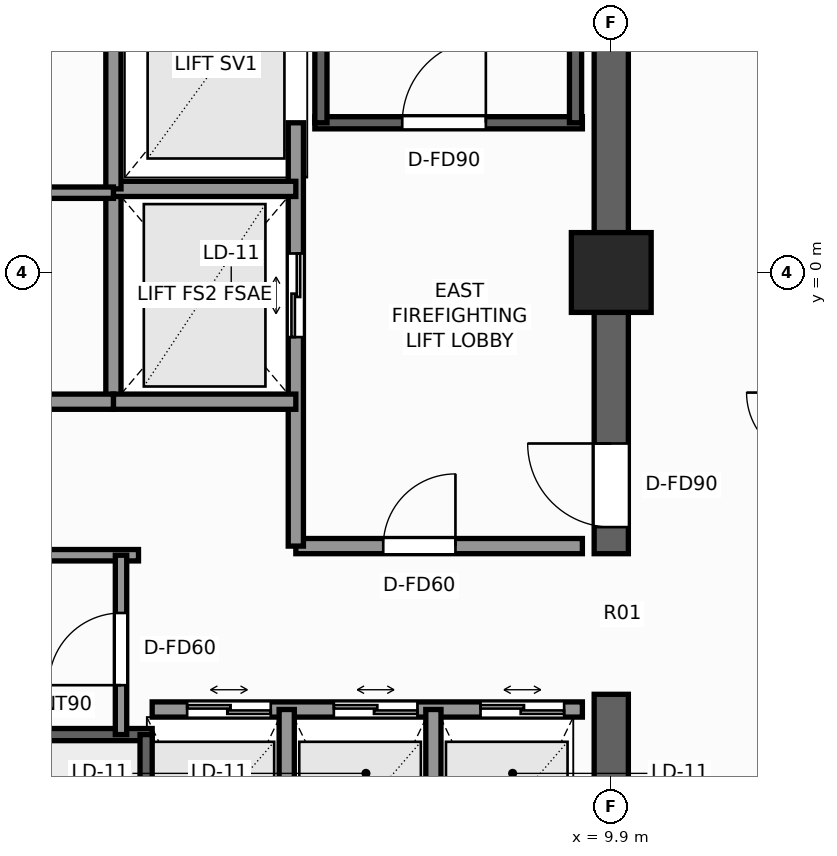
"""IFC4 building model, lengths in metres.
Left out: names, types, materials, properties, quantities, classifications, styles, units other than length and angle.
Written with IfcOpenShell. Run it as: python <this file> out.ifc"""

import sys

from ifc_helpers import new_model, si_unit, direction, frame, frame_2d, origin, origin_2d, place, context, subcontext, project, spatial, rectangle, extrude, element, fill, save


model = new_model("IFC4")
c1 = context("Model", 3, precision=1e-05, world=origin(), true_north=direction((0.0, 1.0)))
c2 = subcontext(c1, "Body", "Model", "MODEL_VIEW")
j1 = project(units=[si_unit("LENGTHUNIT", "METRE"), si_unit("PLANEANGLEUNIT", "RADIAN")], contexts=[c1])
p1 = place(None, origin())
s1 = spatial("IfcSite", under=j1, at=p1, CompositionType="ELEMENT")
p2 = place(p1, origin())
s2 = spatial("IfcBuilding", under=s1, at=p2, CompositionType="ELEMENT")
p3 = place(p2, frame((0.0, 0.0, 209.7)))
s3 = spatial("IfcBuildingStorey", under=s2, at=p3, CompositionType="ELEMENT", Elevation=209.7)
p4 = place(p3, frame((9.9, -9.675, 0.0), z_axis=(0.0, 0.0, 1.0), x_axis=(0.0, 1.0, 0.0)))
e1 = element("IfcWall", 1, at=p4, inside=s3, PredefinedType="SHEAR", context=c2, shape_type="SweptSolid", body=[
    extrude(rectangle(XDim=4.125, YDim=0.45, at=frame_2d((2.062, 0.0))), origin(), (0.0, 0.0, 1.0), 3.3),
])
p5 = place(p3, frame((9.9, -3.7, 0.0), z_axis=(0.0, 0.0, 1.0), x_axis=(0.0, 1.0, 0.0)))
e2 = element("IfcWall", 2, at=p5, inside=s3, PredefinedType="SHEAR", context=c2, shape_type="SweptSolid", body=[
    extrude(rectangle(XDim=13.375, YDim=0.45, at=frame_2d((6.688, 0.0))), origin(), (0.0, 0.0, 1.0), 3.3),
])
p6 = place(p5, frame((0.35, 0.0, 0.0)))
e3 = element("IfcOpeningElement", 3, at=p6, cuts=e2, PredefinedType="OPENING", context=c2, shape_type="SweptSolid", body=[
    extrude(rectangle(XDim=1.1, YDim=2.2, at=frame_2d((0.55, 1.1))), frame((0.0, 0.235, 0.0), z_axis=(0.0, -1.0, 0.0), x_axis=(1.0, 0.0, 0.0)), (0.0, 0.0, 1.0), 0.47),
])
p7 = place(p3, frame((9.9, 0.0, 0.0), z_axis=(0.0, 0.0, 1.0), x_axis=(1.0, 0.0, 0.0)))
e4 = element("IfcColumn", 4, at=p7, inside=s3, PredefinedType="COLUMN", context=c2, shape_type="SweptSolid", body=[
    extrude(rectangle(XDim=1.05, YDim=1.05, at=origin_2d()), origin(), (0.0, 0.0, 1.0), 3.3),
])
p8 = place(p3, frame((6.0, 1.97, 0.0), z_axis=(0.0, 0.0, 1.0), x_axis=(1.0, 0.0, 0.0)))
e5 = element("IfcWall", 5, at=p8, inside=s3, PredefinedType="SHEAR", context=c2, shape_type="SweptSolid", body=[
    extrude(rectangle(XDim=3.52, YDim=0.16, at=frame_2d((1.76, 0.0))), origin(), (0.0, 0.0, 1.0), 3.3),
])
p9 = place(p8, frame((1.15, 0.0, 0.0)))
e6 = element("IfcOpeningElement", 6, at=p9, cuts=e5, PredefinedType="OPENING", context=c2, shape_type="SweptSolid", body=[
    extrude(rectangle(XDim=1.1, YDim=2.2, at=frame_2d((0.55, 1.1))), frame((0.0, 0.09, 0.0), z_axis=(0.0, -1.0, 0.0), x_axis=(1.0, 0.0, 0.0)), (0.0, 0.0, 1.0), 0.18),
])
for number, where, z_axis, x_axis in (
    (7, (6.08, 1.97, 0.0), (0.0, 0.0, 1.0), (0.0, 1.0, 0.0)),
    (8, (9.43, 1.97, 0.0), (0.0, 0.0, 1.0), (0.0, 1.0, 0.0)),
):
    element("IfcWall", number, at=place(p3, frame(where, z_axis=z_axis, x_axis=x_axis)), inside=s3, PredefinedType="SHEAR", context=c2, shape_type="SweptSolid", body=[
        extrude(rectangle(XDim=7.56, YDim=0.16, at=frame_2d((3.78, 0.0))), origin(), (0.0, 0.0, 1.0), 3.3),
    ])
p10 = place(p3, frame((-3.86, -6.08, 0.0), z_axis=(0.0, 0.0, 1.0), x_axis=(1.0, 0.0, 0.0)))
e9 = element("IfcWall", 9, at=p10, inside=s3, PredefinedType="SHEAR", context=c2, shape_type="SweptSolid", body=[
    extrude(rectangle(XDim=7.72, YDim=0.16, at=frame_2d((3.86, 0.0))), origin(), (0.0, 0.0, 1.0), 3.3),
])
p11 = place(p3, frame((3.78, -9.43, 0.0), z_axis=(0.0, 0.0, 1.0), x_axis=(0.0, 1.0, 0.0)))
e10 = element("IfcWall", 10, at=p11, inside=s3, PredefinedType="SHEAR", context=c2, shape_type="SweptSolid", body=[
    extrude(rectangle(XDim=3.35, YDim=0.16, at=frame_2d((1.675, 0.0))), origin(), (0.0, 0.0, 1.0), 3.3),
])
p12 = place(p3, frame((5.75, -3.6, 0.0), z_axis=(0.0, 0.0, 1.0), x_axis=(1.0, 0.0, 0.0)))
e11 = element("IfcWall", 11, at=p12, inside=s3, PredefinedType="SOLIDWALL", context=c2, shape_type="SweptSolid", body=[
    extrude(rectangle(XDim=3.77, YDim=0.2, at=frame_2d((1.885, 0.0))), origin(), (0.0, 0.0, 1.0), 3.08),
])
p13 = place(p12, frame((1.15, 0.0, 0.0)))
e12 = element("IfcOpeningElement", 12, at=p13, cuts=e11, PredefinedType="OPENING", context=c2, shape_type="SweptSolid", body=[
    extrude(rectangle(XDim=0.95, YDim=2.06, at=frame_2d((0.475, 1.03))), frame((0.0, 0.11, 0.0), z_axis=(0.0, -1.0, 0.0), x_axis=(1.0, 0.0, 0.0)), (0.0, 0.0, 1.0), 0.22),
])
p14 = place(p3, frame((5.75, -3.6, 0.0), z_axis=(0.0, 0.0, 1.0), x_axis=(0.0, 1.0, 0.0)))
e13 = element("IfcWall", 13, at=p14, inside=s3, PredefinedType="SOLIDWALL", context=c2, shape_type="SweptSolid", body=[
    extrude(rectangle(XDim=5.57, YDim=0.2, at=frame_2d((2.785, 0.0))), origin(), (0.0, 0.0, 1.0), 3.08),
])
p15 = place(p14, frame((2.75, 0.0, 0.0)))
e14 = element("IfcOpeningElement", 14, at=p15, cuts=e13, PredefinedType="OPENING", context=c2, shape_type="SweptSolid", body=[
    extrude(rectangle(XDim=1.1, YDim=2.2, at=frame_2d((0.55, 1.1))), frame((0.0, 0.11, 0.0), z_axis=(0.0, -1.0, 0.0), x_axis=(1.0, 0.0, 0.0)), (0.0, 0.0, 1.0), 0.22),
])
p16 = place(p3, frame((3.35, -1.7, 0.0), z_axis=(0.0, 0.0, 1.0), x_axis=(0.0, 1.0, 0.0)))
e15 = element("IfcWall", 15, at=p16, inside=s3, PredefinedType="SOLIDWALL", context=c2, shape_type="SweptSolid", body=[
    extrude(rectangle(XDim=2.8, YDim=0.2, at=frame_2d((1.4, 0.0))), origin(), (0.0, 0.0, 1.0), 3.08),
])
for number, where, z_axis, x_axis in (
    (16, (3.35, -1.7, 0.0), (0.0, 0.0, 1.0), (1.0, 0.0, 0.0)),
    (17, (3.35, 1.1, 0.0), (0.0, 0.0, 1.0), (1.0, 0.0, 0.0)),
):
    element("IfcWall", number, at=place(p3, frame(where, z_axis=z_axis, x_axis=x_axis)), inside=s3, PredefinedType="SOLIDWALL", context=c2, shape_type="SweptSolid", body=[
        extrude(rectangle(XDim=2.4, YDim=0.2, at=frame_2d((1.2, 0.0))), origin(), (0.0, 0.0, 1.0), 3.08),
    ])
p17 = place(p3, frame((3.86, -5.75, 0.0), z_axis=(0.0, 0.0, 1.0), x_axis=(1.0, 0.0, 0.0)))
e18 = element("IfcWall", 18, at=p17, inside=s3, PredefinedType="SOLIDWALL", context=c2, shape_type="SweptSolid", body=[
    extrude(rectangle(XDim=5.66, YDim=0.2, at=frame_2d((2.83, 0.0))), origin(), (0.0, 0.0, 1.0), 3.08),
])
p18 = place(p17, frame((0.46, 0.0, 0.0)))
e19 = element("IfcOpeningElement", 19, at=p18, cuts=e18, PredefinedType="OPENING", context=c2, shape_type="SweptSolid", body=[
    extrude(rectangle(XDim=1.1, YDim=2.2, at=frame_2d((0.55, 1.1))), frame((0.0, 0.11, 0.0), z_axis=(0.0, -1.0, 0.0), x_axis=(1.0, 0.0, 0.0)), (0.0, 0.0, 1.0), 0.22),
])
p19 = place(p17, frame((2.39, 0.0, 0.0)))
e20 = element("IfcOpeningElement", 20, at=p19, cuts=e18, PredefinedType="OPENING", context=c2, shape_type="SweptSolid", body=[
    extrude(rectangle(XDim=1.1, YDim=2.2, at=frame_2d((0.55, 1.1))), frame((0.0, 0.11, 0.0), z_axis=(0.0, -1.0, 0.0), x_axis=(1.0, 0.0, 0.0)), (0.0, 0.0, 1.0), 0.22),
])
p20 = place(p17, frame((4.32, 0.0, 0.0)))
e21 = element("IfcOpeningElement", 21, at=p20, cuts=e18, PredefinedType="OPENING", context=c2, shape_type="SweptSolid", body=[
    extrude(rectangle(XDim=1.1, YDim=2.2, at=frame_2d((0.55, 1.1))), frame((0.0, 0.11, 0.0), z_axis=(0.0, -1.0, 0.0), x_axis=(1.0, 0.0, 0.0)), (0.0, 0.0, 1.0), 0.22),
])
for number, where, z_axis, x_axis in (
    (22, (5.63, -9.52, 0.0), (0.0, 0.0, 1.0), (0.0, 1.0, 0.0)),
    (23, (7.56, -9.52, 0.0), (0.0, 0.0, 1.0), (0.0, 1.0, 0.0)),
):
    element("IfcWall", number, at=place(p3, frame(where, z_axis=z_axis, x_axis=x_axis)), inside=s3, PredefinedType="SOLIDWALL", context=c2, shape_type="SweptSolid", body=[
        extrude(rectangle(XDim=3.77, YDim=0.2, at=frame_2d((1.885, 0.0))), origin(), (0.0, 0.0, 1.0), 3.08),
    ])
p21 = place(p3, frame((-3.35, -1.7, 0.0), z_axis=(0.0, 0.0, 1.0), x_axis=(1.0, 0.0, 0.0)))
e24 = element("IfcWall", 24, at=p21, inside=s3, PredefinedType="SOLIDWALL", context=c2, shape_type="SweptSolid", body=[
    extrude(rectangle(XDim=6.7, YDim=0.2, at=frame_2d((3.35, 0.0))), origin(), (0.0, 0.0, 1.0), 3.08),
])
p22 = place(p3, frame((3.35, 1.1, 0.0), z_axis=(0.0, 0.0, 1.0), x_axis=(0.0, 1.0, 0.0)))
e25 = element("IfcWall", 25, at=p22, inside=s3, PredefinedType="SOLIDWALL", context=c2, shape_type="SweptSolid", body=[
    extrude(rectangle(XDim=3.2, YDim=0.2, at=frame_2d((1.6, 0.0))), origin(), (0.0, 0.0, 1.0), 3.08),
])
p23 = place(p3, frame((-3.35, 1.05, 0.0), z_axis=(0.0, 0.0, 1.0), x_axis=(1.0, 0.0, 0.0)))
e26 = element("IfcWall", 26, at=p23, inside=s3, PredefinedType="PARTITIONING", context=c2, shape_type="SweptSolid", body=[
    extrude(rectangle(XDim=6.7, YDim=0.15, at=frame_2d((3.35, 0.0))), origin(), (0.0, 0.0, 1.0), 3.08),
])
p24 = place(p23, frame((4.2, 0.0, 0.0)))
e27 = element("IfcOpeningElement", 27, at=p24, cuts=e26, PredefinedType="OPENING", context=c2, shape_type="SweptSolid", body=[
    extrude(rectangle(XDim=0.85, YDim=2.03, at=frame_2d((0.425, 1.015))), frame((0.0, 0.085, 0.0), z_axis=(0.0, -1.0, 0.0), x_axis=(1.0, 0.0, 0.0)), (0.0, 0.0, 1.0), 0.17),
])
p25 = place(p3, frame((-3.68, -3.72, 0.0), z_axis=(0.0, 0.0, 1.0), x_axis=(1.0, 0.0, 0.0)))
e28 = element("IfcWall", 28, at=p25, inside=s3, PredefinedType="PARTITIONING", context=c2, shape_type="SweptSolid", body=[
    extrude(rectangle(XDim=7.36, YDim=0.15, at=frame_2d((3.68, 0.0))), origin(), (0.0, 0.0, 1.0), 3.08),
])
p26 = place(p3, frame((3.45, -6.08, 0.0), z_axis=(0.0, 0.0, 1.0), x_axis=(0.0, 1.0, 0.0)))
e29 = element("IfcWall", 29, at=p26, inside=s3, PredefinedType="PARTITIONING", context=c2, shape_type="SweptSolid", body=[
    extrude(rectangle(XDim=2.36, YDim=0.15, at=frame_2d((1.18, 0.0))), origin(), (0.0, 0.0, 1.0), 3.08),
])
p27 = place(p26, frame((0.65, 0.0, 0.0)))
e30 = element("IfcOpeningElement", 30, at=p27, cuts=e29, PredefinedType="OPENING", context=c2, shape_type="SweptSolid", body=[
    extrude(rectangle(XDim=0.95, YDim=2.06, at=frame_2d((0.475, 1.03))), frame((0.0, 0.085, 0.0), z_axis=(0.0, -1.0, 0.0), x_axis=(1.0, 0.0, 0.0)), (0.0, 0.0, 1.0), 0.17),
])
p28 = place(p9, origin())
e31 = element("IfcDoor", 31, at=p28, inside=s3, OperationType="SINGLE_SWING_RIGHT", PredefinedType="DOOR", context=c2, shape_type="SweptSolid", body=[
    extrude(rectangle(XDim=1.1, YDim=2.2, at=frame_2d((0.55, 1.1))), frame((0.0, 0.025, 0.0), z_axis=(0.0, -1.0, 0.0), x_axis=(1.0, 0.0, 0.0)), (0.0, 0.0, 1.0), 0.05),
])
fill(e6, e31)
p29 = place(p6, origin())
e32 = element("IfcDoor", 32, at=p29, inside=s3, OperationType="SINGLE_SWING_RIGHT", PredefinedType="DOOR", context=c2, shape_type="SweptSolid", body=[
    extrude(rectangle(XDim=1.1, YDim=2.2, at=frame_2d((0.55, 1.1))), frame((0.0, 0.025, 0.0), z_axis=(0.0, -1.0, 0.0), x_axis=(1.0, 0.0, 0.0)), (0.0, 0.0, 1.0), 0.05),
])
fill(e3, e32)
p30 = place(p15, origin())
e33 = element("IfcDoor", 33, at=p30, inside=s3, OperationType="DOUBLE_DOOR_SLIDING", PredefinedType="DOOR", context=c2, shape_type="SweptSolid", body=[
    extrude(rectangle(XDim=1.1, YDim=2.2, at=frame_2d((0.55, 1.1))), frame((0.0, 0.025, 0.0), z_axis=(0.0, -1.0, 0.0), x_axis=(1.0, 0.0, 0.0)), (0.0, 0.0, 1.0), 0.05),
])
fill(e14, e33)
p31 = place(p18, origin())
e34 = element("IfcDoor", 34, at=p31, inside=s3, OperationType="DOUBLE_DOOR_SLIDING", PredefinedType="DOOR", context=c2, shape_type="SweptSolid", body=[
    extrude(rectangle(XDim=1.1, YDim=2.2, at=frame_2d((0.55, 1.1))), frame((0.0, 0.025, 0.0), z_axis=(0.0, -1.0, 0.0), x_axis=(1.0, 0.0, 0.0)), (0.0, 0.0, 1.0), 0.05),
])
fill(e19, e34)
p32 = place(p19, origin())
e35 = element("IfcDoor", 35, at=p32, inside=s3, OperationType="DOUBLE_DOOR_SLIDING", PredefinedType="DOOR", context=c2, shape_type="SweptSolid", body=[
    extrude(rectangle(XDim=1.1, YDim=2.2, at=frame_2d((0.55, 1.1))), frame((0.0, 0.025, 0.0), z_axis=(0.0, -1.0, 0.0), x_axis=(1.0, 0.0, 0.0)), (0.0, 0.0, 1.0), 0.05),
])
fill(e20, e35)
p33 = place(p20, origin())
e36 = element("IfcDoor", 36, at=p33, inside=s3, OperationType="DOUBLE_DOOR_SLIDING", PredefinedType="DOOR", context=c2, shape_type="SweptSolid", body=[
    extrude(rectangle(XDim=1.1, YDim=2.2, at=frame_2d((0.55, 1.1))), frame((0.0, 0.025, 0.0), z_axis=(0.0, -1.0, 0.0), x_axis=(1.0, 0.0, 0.0)), (0.0, 0.0, 1.0), 0.05),
])
fill(e21, e36)
p34 = place(p13, origin())
e37 = element("IfcDoor", 37, at=p34, inside=s3, OperationType="SINGLE_SWING_RIGHT", PredefinedType="DOOR", context=c2, shape_type="SweptSolid", body=[
    extrude(rectangle(XDim=0.95, YDim=2.06, at=frame_2d((0.475, 1.03))), frame((0.0, 0.025, 0.0), z_axis=(0.0, -1.0, 0.0), x_axis=(1.0, 0.0, 0.0)), (0.0, 0.0, 1.0), 0.05),
])
fill(e12, e37)
p35 = place(p27, origin())
e38 = element("IfcDoor", 38, at=p35, inside=s3, OperationType="SINGLE_SWING_LEFT", PredefinedType="DOOR", context=c2, shape_type="SweptSolid", body=[
    extrude(rectangle(XDim=0.95, YDim=2.06, at=frame_2d((0.475, 1.03))), frame((0.0, 0.025, 0.0), z_axis=(0.0, -1.0, 0.0), x_axis=(1.0, 0.0, 0.0)), (0.0, 0.0, 1.0), 0.05),
])
fill(e30, e38)
save(model, sys.argv[1])
